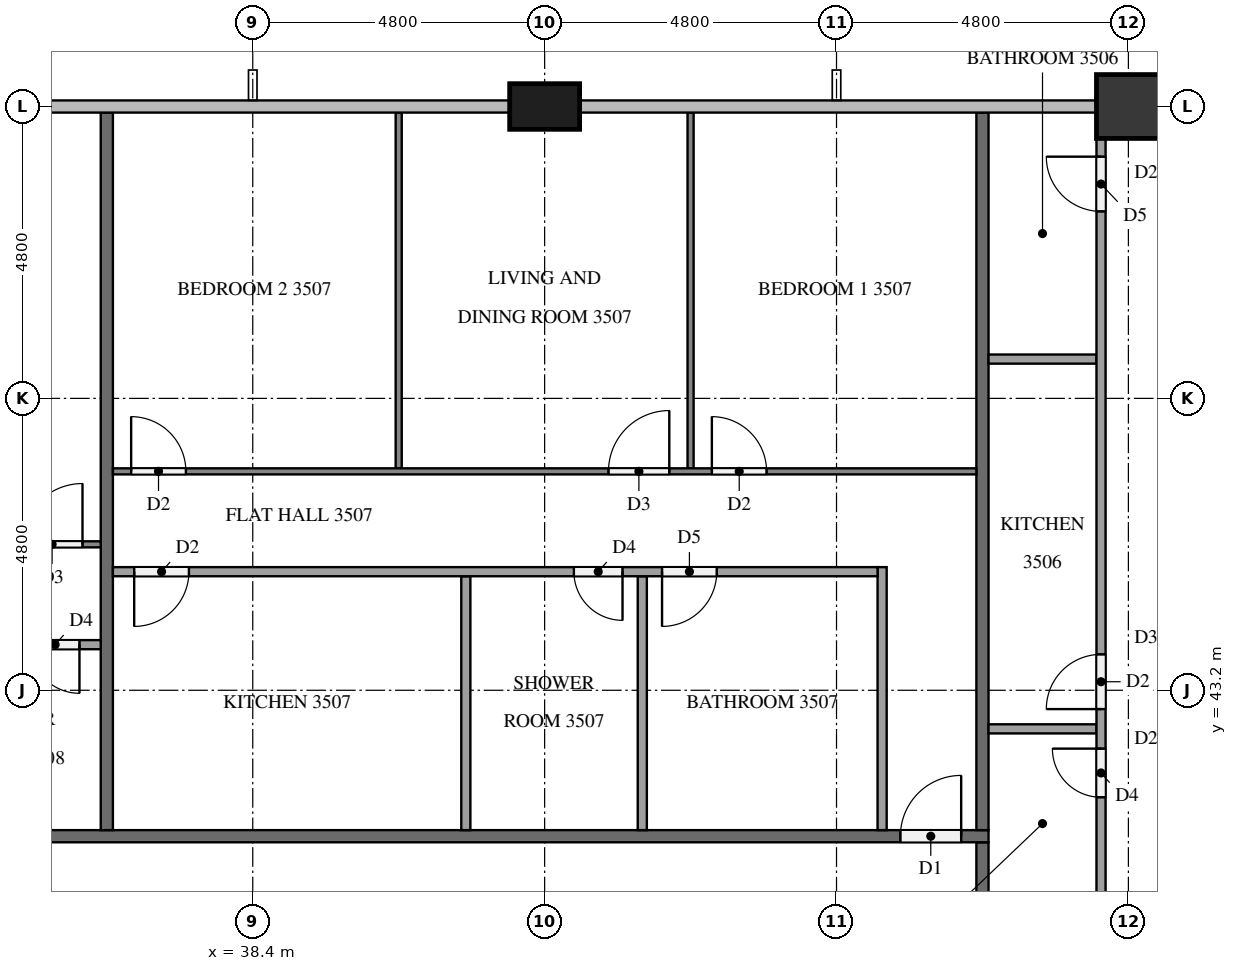
"""IFC4 building model, lengths in metres.
Left out: names, types, materials, properties, quantities, classifications, styles, units other than length and angle.
Written with IfcOpenShell. Run it as: python <this file> out.ifc"""

import sys

from ifc_helpers import new_model, si_unit, direction, frame, frame_2d, origin, origin_2d, place, context, subcontext, project, spatial, rectangle, extrude, element, fill, save


model = new_model("IFC4")
c1 = context("Model", 3, precision=1e-05, world=origin(), true_north=direction((0.0, 1.0)))
c2 = subcontext(c1, "Body", "Model", "MODEL_VIEW")
j1 = project(units=[si_unit("LENGTHUNIT", "METRE"), si_unit("PLANEANGLEUNIT", "RADIAN")], contexts=[c1])
p1 = place(None, origin())
s1 = spatial("IfcSite", under=j1, at=p1, CompositionType="ELEMENT")
p2 = place(p1, origin())
s2 = spatial("IfcBuilding", under=s1, at=p2, CompositionType="ELEMENT")
p3 = place(p2, frame((0.0, 0.0, 136.6)))
s3 = spatial("IfcBuildingStorey", under=s2, at=p3, CompositionType="ELEMENT", Elevation=136.6)
p4 = place(p3, frame((52.8, 52.8, 0.0), z_axis=(0.0, 0.0, 1.0), x_axis=(1.0, 0.0, 0.0)))
e1 = element("IfcColumn", 1, at=p4, inside=s3, PredefinedType="COLUMN", context=c2, shape_type="SweptSolid", body=[
    extrude(rectangle(XDim=1.05, YDim=1.05, at=origin_2d()), origin(), (0.0, 0.0, 1.0), 3.2),
])
p5 = place(p3, frame((43.2, 52.8, 0.0), z_axis=(0.0, 0.0, 1.0), x_axis=(1.0, 0.0, 0.0)))
e2 = element("IfcColumn", 2, at=p5, inside=s3, PredefinedType="COLUMN", context=c2, shape_type="SweptSolid", body=[
    extrude(rectangle(XDim=1.15, YDim=0.75, at=origin_2d()), origin(), (0.0, 0.0, 1.0), 3.2),
])
p6 = place(p3, frame((50.4, 40.7, 0.0), z_axis=(0.0, 0.0, 1.0), x_axis=(0.0, -1.0, 0.0)))
e3 = element("IfcWall", 3, at=p6, inside=s3, PredefinedType="PARTITIONING", context=c2, shape_type="SweptSolid", body=[
    extrude(rectangle(XDim=2.8, YDim=0.2, at=frame_2d((1.4, 0.0))), origin(), (0.0, 0.0, 1.0), 3.2),
])
p7 = place(p6, frame((1.55, 0.0, 0.0)))
e4 = element("IfcOpeningElement", 4, at=p7, cuts=e3, PredefinedType="OPENING", context=c2, shape_type="SweptSolid", body=[
    extrude(rectangle(XDim=1.0, YDim=2.1, at=frame_2d((0.5, 1.05))), frame((0.0, 0.11, 0.0), z_axis=(0.0, -1.0, 0.0), x_axis=(1.0, 0.0, 0.0)), (0.0, 0.0, 1.0), 0.22),
])
p8 = place(p3, frame((11.9, 40.8, 0.0), z_axis=(0.0, 0.0, 1.0), x_axis=(1.0, 0.0, 0.0)))
e5 = element("IfcWall", 5, at=p8, inside=s3, PredefinedType="PARTITIONING", context=c2, shape_type="SweptSolid", body=[
    extrude(rectangle(XDim=38.6, YDim=0.2, at=frame_2d((19.3, 0.0))), origin(), (0.0, 0.0, 1.0), 3.2),
])
p9 = place(p8, frame((37.15, 0.0, 0.0)))
e6 = element("IfcOpeningElement", 6, at=p9, cuts=e5, PredefinedType="OPENING", context=c2, shape_type="SweptSolid", body=[
    extrude(rectangle(XDim=1.0, YDim=2.1, at=frame_2d((0.5, 1.05))), frame((0.0, 0.11, 0.0), z_axis=(0.0, -1.0, 0.0), x_axis=(1.0, 0.0, 0.0)), (0.0, 0.0, 1.0), 0.22),
])
p10 = place(p8, frame((10.05, 0.0, 0.0)))
e7 = element("IfcOpeningElement", 7, at=p10, cuts=e5, PredefinedType="OPENING", context=c2, shape_type="SweptSolid", body=[
    extrude(rectangle(XDim=1.0, YDim=2.1, at=frame_2d((0.5, 1.05))), frame((0.0, 0.11, 0.0), z_axis=(0.0, -1.0, 0.0), x_axis=(1.0, 0.0, 0.0)), (0.0, 0.0, 1.0), 0.22),
])
p11 = place(p8, frame((0.45, 0.0, 0.0)))
e8 = element("IfcOpeningElement", 8, at=p11, cuts=e5, PredefinedType="OPENING", context=c2, shape_type="SweptSolid", body=[
    extrude(rectangle(XDim=1.0, YDim=2.1, at=frame_2d((0.5, 1.05))), frame((0.0, 0.11, 0.0), z_axis=(0.0, -1.0, 0.0), x_axis=(1.0, 0.0, 0.0)), (0.0, 0.0, 1.0), 0.22),
])
for number, where, z_axis, x_axis in (
    (9, (50.4, 40.9, 0.0), (0.0, 0.0, 1.0), (0.0, 1.0, 0.0)),
    (10, (36.0, 52.7, 0.0), (0.0, 0.0, 1.0), (0.0, -1.0, 0.0)),
):
    element("IfcWall", number, at=place(p3, frame(where, z_axis=z_axis, x_axis=x_axis)), inside=s3, PredefinedType="PARTITIONING", context=c2, shape_type="SweptSolid", body=[
        extrude(rectangle(XDim=11.8, YDim=0.2, at=frame_2d((5.9, 0.0))), origin(), (0.0, 0.0, 1.0), 3.2),
    ])
for number, where, z_axis, x_axis in (
    (11, (50.5, 42.565, 0.0), (0.0, 0.0, 1.0), (1.0, 0.0, 0.0)),
    (12, (50.5, 48.646, 0.0), (0.0, 0.0, 1.0), (1.0, 0.0, 0.0)),
):
    element("IfcWall", number, at=place(p3, frame(where, z_axis=z_axis, x_axis=x_axis)), inside=s3, PredefinedType="PARTITIONING", context=c2, shape_type="SweptSolid", body=[
        extrude(rectangle(XDim=1.775, YDim=0.15, at=frame_2d((0.887, 0.0))), origin(), (0.0, 0.0, 1.0), 3.2),
    ])
p12 = place(p3, frame((52.35, 39.525, 0.0), z_axis=(0.0, 0.0, 1.0), x_axis=(0.0, 1.0, 0.0)))
e13 = element("IfcWall", 13, at=p12, inside=s3, PredefinedType="PARTITIONING", context=c2, shape_type="SweptSolid", body=[
    extrude(rectangle(XDim=12.75, YDim=0.15, at=frame_2d((6.375, 0.0))), origin(), (0.0, 0.0, 1.0), 3.2),
])
p13 = place(p12, frame((1.915, 0.0, 0.0)))
e14 = element("IfcOpeningElement", 14, at=p13, cuts=e13, PredefinedType="OPENING", context=c2, shape_type="SweptSolid", body=[
    extrude(rectangle(XDim=0.8, YDim=2.1, at=frame_2d((0.4, 1.05))), frame((0.0, 0.085, 0.0), z_axis=(0.0, -1.0, 0.0), x_axis=(1.0, 0.0, 0.0)), (0.0, 0.0, 1.0), 0.17),
])
p14 = place(p12, frame((3.365, 0.0, 0.0)))
e15 = element("IfcOpeningElement", 15, at=p14, cuts=e13, PredefinedType="OPENING", context=c2, shape_type="SweptSolid", body=[
    extrude(rectangle(XDim=0.9, YDim=2.1, at=frame_2d((0.45, 1.05))), frame((0.0, 0.085, 0.0), z_axis=(0.0, -1.0, 0.0), x_axis=(1.0, 0.0, 0.0)), (0.0, 0.0, 1.0), 0.17),
])
p15 = place(p12, frame((11.55, 0.0, 0.0)))
e16 = element("IfcOpeningElement", 16, at=p15, cuts=e13, PredefinedType="OPENING", context=c2, shape_type="SweptSolid", body=[
    extrude(rectangle(XDim=0.9, YDim=2.1, at=frame_2d((0.45, 1.05))), frame((0.0, 0.085, 0.0), z_axis=(0.0, -1.0, 0.0), x_axis=(1.0, 0.0, 0.0)), (0.0, 0.0, 1.0), 0.17),
])
for number, where, z_axis, x_axis in (
    (17, (45.6, 46.85, 0.0), (0.0, 0.0, 1.0), (0.0, 1.0, 0.0)),
    (18, (40.8, 46.85, 0.0), (0.0, 0.0, 1.0), (0.0, 1.0, 0.0)),
):
    element("IfcWall", number, at=place(p3, frame(where, z_axis=z_axis, x_axis=x_axis)), inside=s3, PredefinedType="PARTITIONING", context=c2, shape_type="SweptSolid", body=[
        extrude(rectangle(XDim=5.85, YDim=0.1, at=frame_2d((2.925, 0.0))), origin(), (0.0, 0.0, 1.0), 3.2),
    ])
p16 = place(p3, frame((36.1, 46.8, 0.0), z_axis=(0.0, 0.0, 1.0), x_axis=(1.0, 0.0, 0.0)))
e19 = element("IfcWall", 19, at=p16, inside=s3, PredefinedType="PARTITIONING", context=c2, shape_type="SweptSolid", body=[
    extrude(rectangle(XDim=14.2, YDim=0.1, at=frame_2d((7.1, 0.0))), origin(), (0.0, 0.0, 1.0), 3.2),
])
p17 = place(p16, frame((9.85, 0.0, 0.0)))
e20 = element("IfcOpeningElement", 20, at=p17, cuts=e19, PredefinedType="OPENING", context=c2, shape_type="SweptSolid", body=[
    extrude(rectangle(XDim=0.9, YDim=2.1, at=frame_2d((0.45, 1.05))), frame((0.0, 0.06, 0.0), z_axis=(0.0, -1.0, 0.0), x_axis=(1.0, 0.0, 0.0)), (0.0, 0.0, 1.0), 0.12),
])
p18 = place(p16, frame((8.15, 0.0, 0.0)))
e21 = element("IfcOpeningElement", 21, at=p18, cuts=e19, PredefinedType="OPENING", context=c2, shape_type="SweptSolid", body=[
    extrude(rectangle(XDim=1.0, YDim=2.1, at=frame_2d((0.5, 1.05))), frame((0.0, 0.06, 0.0), z_axis=(0.0, -1.0, 0.0), x_axis=(1.0, 0.0, 0.0)), (0.0, 0.0, 1.0), 0.12),
])
p19 = place(p16, frame((0.3, 0.0, 0.0)))
e22 = element("IfcOpeningElement", 22, at=p19, cuts=e19, PredefinedType="OPENING", context=c2, shape_type="SweptSolid", body=[
    extrude(rectangle(XDim=0.9, YDim=2.1, at=frame_2d((0.45, 1.05))), frame((0.0, 0.06, 0.0), z_axis=(0.0, -1.0, 0.0), x_axis=(1.0, 0.0, 0.0)), (0.0, 0.0, 1.0), 0.12),
])
for number, where, z_axis, x_axis in (
    (23, (44.806, 40.9, 0.0), (0.0, 0.0, 1.0), (0.0, 1.0, 0.0)),
    (24, (41.904, 40.9, 0.0), (0.0, 0.0, 1.0), (0.0, 1.0, 0.0)),
):
    element("IfcWall", number, at=place(p3, frame(where, z_axis=z_axis, x_axis=x_axis)), inside=s3, PredefinedType="PARTITIONING", context=c2, shape_type="SweptSolid", body=[
        extrude(rectangle(XDim=4.175, YDim=0.15, at=frame_2d((2.087, 0.0))), origin(), (0.0, 0.0, 1.0), 3.2),
    ])
p20 = place(p3, frame((48.75, 40.9, 0.0), z_axis=(0.0, 0.0, 1.0), x_axis=(0.0, 1.0, 0.0)))
e25 = element("IfcWall", 25, at=p20, inside=s3, PredefinedType="PARTITIONING", context=c2, shape_type="SweptSolid", body=[
    extrude(rectangle(XDim=4.325, YDim=0.15, at=frame_2d((2.163, 0.0))), origin(), (0.0, 0.0, 1.0), 3.2),
])
p21 = place(p3, frame((48.675, 45.15, 0.0), z_axis=(0.0, 0.0, 1.0), x_axis=(-1.0, 0.0, 0.0)))
e26 = element("IfcWall", 26, at=p21, inside=s3, PredefinedType="PARTITIONING", context=c2, shape_type="SweptSolid", body=[
    extrude(rectangle(XDim=12.575, YDim=0.15, at=frame_2d((6.288, 0.0))), origin(), (0.0, 0.0, 1.0), 3.2),
])
p22 = place(p21, frame((2.644, 0.0, 0.0)))
e27 = element("IfcOpeningElement", 27, at=p22, cuts=e26, PredefinedType="OPENING", context=c2, shape_type="SweptSolid", body=[
    extrude(rectangle(XDim=0.9, YDim=2.1, at=frame_2d((0.45, 1.05))), frame((0.0, 0.085, 0.0), z_axis=(0.0, -1.0, 0.0), x_axis=(1.0, 0.0, 0.0)), (0.0, 0.0, 1.0), 0.17),
])
p23 = place(p21, frame((4.194, 0.0, 0.0)))
e28 = element("IfcOpeningElement", 28, at=p23, cuts=e26, PredefinedType="OPENING", context=c2, shape_type="SweptSolid", body=[
    extrude(rectangle(XDim=0.8, YDim=2.1, at=frame_2d((0.4, 1.05))), frame((0.0, 0.085, 0.0), z_axis=(0.0, -1.0, 0.0), x_axis=(1.0, 0.0, 0.0)), (0.0, 0.0, 1.0), 0.17),
])
p24 = place(p21, frame((11.325, 0.0, 0.0)))
e29 = element("IfcOpeningElement", 29, at=p24, cuts=e26, PredefinedType="OPENING", context=c2, shape_type="SweptSolid", body=[
    extrude(rectangle(XDim=0.9, YDim=2.1, at=frame_2d((0.45, 1.05))), frame((0.0, 0.085, 0.0), z_axis=(0.0, -1.0, 0.0), x_axis=(1.0, 0.0, 0.0)), (0.0, 0.0, 1.0), 0.17),
])
p25 = place(p3, frame((21.7, 45.6, 0.0), z_axis=(0.0, 0.0, 1.0), x_axis=(1.0, 0.0, 0.0)))
e30 = element("IfcWall", 30, at=p25, inside=s3, PredefinedType="PARTITIONING", context=c2, shape_type="SweptSolid", body=[
    extrude(rectangle(XDim=14.2, YDim=0.1, at=frame_2d((7.1, 0.0))), origin(), (0.0, 0.0, 1.0), 3.2),
])
p26 = place(p25, frame((3.45, 0.0, 0.0)))
e31 = element("IfcOpeningElement", 31, at=p26, cuts=e30, PredefinedType="OPENING", context=c2, shape_type="SweptSolid", body=[
    extrude(rectangle(XDim=0.9, YDim=2.1, at=frame_2d((0.45, 1.05))), frame((0.0, 0.06, 0.0), z_axis=(0.0, -1.0, 0.0), x_axis=(1.0, 0.0, 0.0)), (0.0, 0.0, 1.0), 0.12),
])
p27 = place(p25, frame((5.05, 0.0, 0.0)))
e32 = element("IfcOpeningElement", 32, at=p27, cuts=e30, PredefinedType="OPENING", context=c2, shape_type="SweptSolid", body=[
    extrude(rectangle(XDim=0.9, YDim=2.1, at=frame_2d((0.45, 1.05))), frame((0.0, 0.06, 0.0), z_axis=(0.0, -1.0, 0.0), x_axis=(1.0, 0.0, 0.0)), (0.0, 0.0, 1.0), 0.12),
])
p28 = place(p25, frame((12.9, 0.0, 0.0)))
e33 = element("IfcOpeningElement", 33, at=p28, cuts=e30, PredefinedType="OPENING", context=c2, shape_type="SweptSolid", body=[
    extrude(rectangle(XDim=1.0, YDim=2.1, at=frame_2d((0.5, 1.05))), frame((0.0, 0.06, 0.0), z_axis=(0.0, -1.0, 0.0), x_axis=(1.0, 0.0, 0.0)), (0.0, 0.0, 1.0), 0.12),
])
p29 = place(p3, frame((35.9, 43.95, 0.0), z_axis=(0.0, 0.0, 1.0), x_axis=(-1.0, 0.0, 0.0)))
e34 = element("IfcWall", 34, at=p29, inside=s3, PredefinedType="PARTITIONING", context=c2, shape_type="SweptSolid", body=[
    extrude(rectangle(XDim=12.575, YDim=0.15, at=frame_2d((6.288, 0.0))), origin(), (0.0, 0.0, 1.0), 3.2),
])
p30 = place(p29, frame((7.096, 0.0, 0.0)))
e35 = element("IfcOpeningElement", 35, at=p30, cuts=e34, PredefinedType="OPENING", context=c2, shape_type="SweptSolid", body=[
    extrude(rectangle(XDim=0.9, YDim=2.1, at=frame_2d((0.45, 1.05))), frame((0.0, 0.085, 0.0), z_axis=(0.0, -1.0, 0.0), x_axis=(1.0, 0.0, 0.0)), (0.0, 0.0, 1.0), 0.17),
])
p31 = place(p29, frame((5.546, 0.0, 0.0)))
e36 = element("IfcOpeningElement", 36, at=p31, cuts=e34, PredefinedType="OPENING", context=c2, shape_type="SweptSolid", body=[
    extrude(rectangle(XDim=0.9, YDim=2.1, at=frame_2d((0.45, 1.05))), frame((0.0, 0.085, 0.0), z_axis=(0.0, -1.0, 0.0), x_axis=(1.0, 0.0, 0.0)), (0.0, 0.0, 1.0), 0.17),
])
p32 = place(p29, frame((0.35, 0.0, 0.0)))
e37 = element("IfcOpeningElement", 37, at=p32, cuts=e34, PredefinedType="OPENING", context=c2, shape_type="SweptSolid", body=[
    extrude(rectangle(XDim=0.8, YDim=2.1, at=frame_2d((0.4, 1.05))), frame((0.0, 0.085, 0.0), z_axis=(0.0, -1.0, 0.0), x_axis=(1.0, 0.0, 0.0)), (0.0, 0.0, 1.0), 0.17),
])
p33 = place(p9, origin())
e38 = element("IfcDoor", 38, at=p33, inside=s3, OperationType="SINGLE_SWING_RIGHT", PredefinedType="DOOR", context=c2, shape_type="SweptSolid", body=[
    extrude(rectangle(XDim=1.0, YDim=2.1, at=frame_2d((0.5, 1.05))), frame((0.0, 0.025, 0.0), z_axis=(0.0, -1.0, 0.0), x_axis=(1.0, 0.0, 0.0)), (0.0, 0.0, 1.0), 0.05),
])
fill(e6, e38)
p34 = place(p13, origin())
e39 = element("IfcDoor", 39, at=p34, inside=s3, OperationType="SINGLE_SWING_RIGHT", PredefinedType="DOOR", context=c2, shape_type="SweptSolid", body=[
    extrude(rectangle(XDim=0.8, YDim=2.1, at=frame_2d((0.4, 1.05))), frame((0.0, 0.025, 0.0), z_axis=(0.0, -1.0, 0.0), x_axis=(1.0, 0.0, 0.0)), (0.0, 0.0, 1.0), 0.05),
])
fill(e14, e39)
p35 = place(p14, origin())
e40 = element("IfcDoor", 40, at=p35, inside=s3, OperationType="SINGLE_SWING_LEFT", PredefinedType="DOOR", context=c2, shape_type="SweptSolid", body=[
    extrude(rectangle(XDim=0.9, YDim=2.1, at=frame_2d((0.45, 1.05))), frame((0.0, 0.025, 0.0), z_axis=(0.0, -1.0, 0.0), x_axis=(1.0, 0.0, 0.0)), (0.0, 0.0, 1.0), 0.05),
])
fill(e15, e40)
p36 = place(p15, origin())
e41 = element("IfcDoor", 41, at=p36, inside=s3, OperationType="SINGLE_SWING_RIGHT", PredefinedType="DOOR", context=c2, shape_type="SweptSolid", body=[
    extrude(rectangle(XDim=0.9, YDim=2.1, at=frame_2d((0.45, 1.05))), frame((0.0, 0.025, 0.0), z_axis=(0.0, -1.0, 0.0), x_axis=(1.0, 0.0, 0.0)), (0.0, 0.0, 1.0), 0.05),
])
fill(e16, e41)
p37 = place(p17, origin())
e42 = element("IfcDoor", 42, at=p37, inside=s3, OperationType="SINGLE_SWING_LEFT", PredefinedType="DOOR", context=c2, shape_type="SweptSolid", body=[
    extrude(rectangle(XDim=0.9, YDim=2.1, at=frame_2d((0.45, 1.05))), frame((0.0, 0.025, 0.0), z_axis=(0.0, -1.0, 0.0), x_axis=(1.0, 0.0, 0.0)), (0.0, 0.0, 1.0), 0.05),
])
fill(e20, e42)
p38 = place(p18, origin())
e43 = element("IfcDoor", 43, at=p38, inside=s3, OperationType="SINGLE_SWING_RIGHT", PredefinedType="DOOR", context=c2, shape_type="SweptSolid", body=[
    extrude(rectangle(XDim=1.0, YDim=2.1, at=frame_2d((0.5, 1.05))), frame((0.0, 0.025, 0.0), z_axis=(0.0, -1.0, 0.0), x_axis=(1.0, 0.0, 0.0)), (0.0, 0.0, 1.0), 0.05),
])
fill(e21, e43)
p39 = place(p19, origin())
e44 = element("IfcDoor", 44, at=p39, inside=s3, OperationType="SINGLE_SWING_LEFT", PredefinedType="DOOR", context=c2, shape_type="SweptSolid", body=[
    extrude(rectangle(XDim=0.9, YDim=2.1, at=frame_2d((0.45, 1.05))), frame((0.0, 0.025, 0.0), z_axis=(0.0, -1.0, 0.0), x_axis=(1.0, 0.0, 0.0)), (0.0, 0.0, 1.0), 0.05),
])
fill(e22, e44)
p40 = place(p22, origin())
e45 = element("IfcDoor", 45, at=p40, inside=s3, OperationType="SINGLE_SWING_RIGHT", PredefinedType="DOOR", context=c2, shape_type="SweptSolid", body=[
    extrude(rectangle(XDim=0.9, YDim=2.1, at=frame_2d((0.45, 1.05))), frame((0.0, 0.025, 0.0), z_axis=(0.0, -1.0, 0.0), x_axis=(1.0, 0.0, 0.0)), (0.0, 0.0, 1.0), 0.05),
])
fill(e27, e45)
p41 = place(p23, origin())
e46 = element("IfcDoor", 46, at=p41, inside=s3, OperationType="SINGLE_SWING_LEFT", PredefinedType="DOOR", context=c2, shape_type="SweptSolid", body=[
    extrude(rectangle(XDim=0.8, YDim=2.1, at=frame_2d((0.4, 1.05))), frame((0.0, 0.025, 0.0), z_axis=(0.0, -1.0, 0.0), x_axis=(1.0, 0.0, 0.0)), (0.0, 0.0, 1.0), 0.05),
])
fill(e28, e46)
p42 = place(p24, origin())
e47 = element("IfcDoor", 47, at=p42, inside=s3, OperationType="SINGLE_SWING_RIGHT", PredefinedType="DOOR", context=c2, shape_type="SweptSolid", body=[
    extrude(rectangle(XDim=0.9, YDim=2.1, at=frame_2d((0.45, 1.05))), frame((0.0, 0.025, 0.0), z_axis=(0.0, -1.0, 0.0), x_axis=(1.0, 0.0, 0.0)), (0.0, 0.0, 1.0), 0.05),
])
fill(e29, e47)
p43 = place(p28, origin())
e48 = element("IfcDoor", 48, at=p43, inside=s3, OperationType="SINGLE_SWING_RIGHT", PredefinedType="DOOR", context=c2, shape_type="SweptSolid", body=[
    extrude(rectangle(XDim=1.0, YDim=2.1, at=frame_2d((0.5, 1.05))), frame((0.0, 0.025, 0.0), z_axis=(0.0, -1.0, 0.0), x_axis=(1.0, 0.0, 0.0)), (0.0, 0.0, 1.0), 0.05),
])
fill(e33, e48)
p44 = place(p32, origin())
e49 = element("IfcDoor", 49, at=p44, inside=s3, OperationType="SINGLE_SWING_LEFT", PredefinedType="DOOR", context=c2, shape_type="SweptSolid", body=[
    extrude(rectangle(XDim=0.8, YDim=2.1, at=frame_2d((0.4, 1.05))), frame((0.0, 0.025, 0.0), z_axis=(0.0, -1.0, 0.0), x_axis=(1.0, 0.0, 0.0)), (0.0, 0.0, 1.0), 0.05),
])
fill(e37, e49)
save(model, sys.argv[1])
